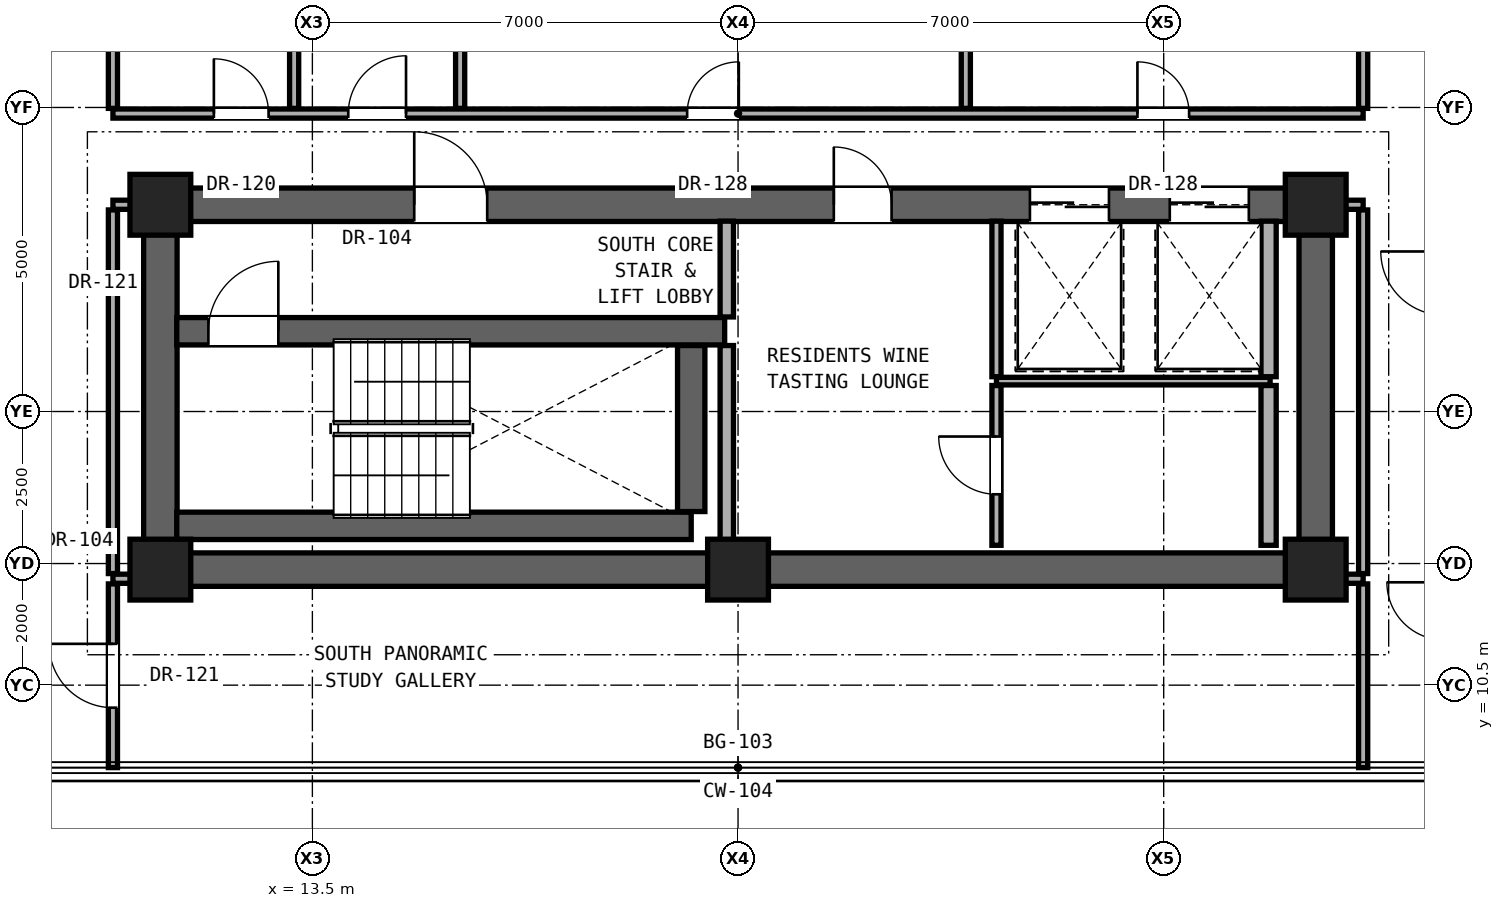
"""IFC4 building model, lengths in metres.
Left out: names, types, materials, properties, quantities, classifications, styles, units other than length and angle.
Written with IfcOpenShell. Run it as: python <this file> out.ifc"""

import sys

from ifc_helpers import new_model, si_unit, direction, frame, frame_2d, origin, origin_2d, place, context, subcontext, project, spatial, rectangle, extrude, element, fill, save


model = new_model("IFC4")
c1 = context("Model", 3, precision=1e-05, world=origin(), true_north=direction((0.0, 1.0)))
c2 = subcontext(c1, "Body", "Model", "MODEL_VIEW")
j1 = project(units=[si_unit("LENGTHUNIT", "METRE"), si_unit("PLANEANGLEUNIT", "RADIAN")], contexts=[c1])
p1 = place(None, origin())
s1 = spatial("IfcSite", under=j1, at=p1, CompositionType="ELEMENT")
p2 = place(p1, origin())
s2 = spatial("IfcBuilding", under=s1, at=p2, CompositionType="ELEMENT")
p3 = place(p2, frame((0.0, 0.0, 177.15)))
s3 = spatial("IfcBuildingStorey", under=s2, at=p3, CompositionType="ELEMENT", Elevation=177.15)
for number, where, z_axis, x_axis in (
    (1, (11.0, 12.4, 0.0), (0.0, 0.0, 1.0), (1.0, 0.0, 0.0)),
    (2, (20.5, 12.4, 0.0), (0.0, 0.0, 1.0), (1.0, 0.0, 0.0)),
    (3, (30.0, 12.4, 0.0), (0.0, 0.0, 1.0), (1.0, 0.0, 0.0)),
    (4, (11.0, 18.4, 0.0), (0.0, 0.0, 1.0), (1.0, 0.0, 0.0)),
    (5, (30.0, 18.4, 0.0), (0.0, 0.0, 1.0), (1.0, 0.0, 0.0)),
):
    element("IfcColumn", number, at=place(p3, frame(where, z_axis=z_axis, x_axis=x_axis)), inside=s3, PredefinedType="COLUMN", context=c2, shape_type="SweptSolid", body=[
        extrude(rectangle(XDim=1.0, YDim=1.0, at=origin_2d()), origin(), (0.0, 0.0, 1.0), 3.25),
    ])
p4 = place(p3, frame((11.0, 12.4, 0.0), z_axis=(0.0, 0.0, 1.0), x_axis=(1.0, 0.0, 0.0)))
e6 = element("IfcWall", 6, at=p4, inside=s3, PredefinedType="SHEAR", context=c2, shape_type="SweptSolid", body=[
    extrude(rectangle(XDim=19.0, YDim=0.55, at=frame_2d((9.5, 0.0))), origin(), (0.0, 0.0, 1.0), 3.05),
])
for number, where, z_axis, x_axis in (
    (7, (11.0, 12.4, 0.0), (0.0, 0.0, 1.0), (0.0, 1.0, 0.0)),
    (8, (30.0, 12.4, 0.0), (0.0, 0.0, 1.0), (0.0, 1.0, 0.0)),
):
    element("IfcWall", number, at=place(p3, frame(where, z_axis=z_axis, x_axis=x_axis)), inside=s3, PredefinedType="SHEAR", context=c2, shape_type="SweptSolid", body=[
        extrude(rectangle(XDim=6.0, YDim=0.55, at=frame_2d((3.0, 0.0))), origin(), (0.0, 0.0, 1.0), 3.05),
    ])
p5 = place(p3, frame((11.0, 18.4, 0.0), z_axis=(0.0, 0.0, 1.0), x_axis=(1.0, 0.0, 0.0)))
e9 = element("IfcWall", 9, at=p5, inside=s3, PredefinedType="SHEAR", context=c2, shape_type="SweptSolid", body=[
    extrude(rectangle(XDim=19.0, YDim=0.55, at=frame_2d((9.5, 0.0))), origin(), (0.0, 0.0, 1.0), 3.05),
])
p6 = place(p5, frame((4.175, 0.0, 0.0)))
e10 = element("IfcOpeningElement", 10, at=p6, cuts=e9, PredefinedType="OPENING", context=c2, shape_type="SweptSolid", body=[
    extrude(rectangle(XDim=1.2, YDim=2.25, at=frame_2d((0.6, 1.125))), frame((0.0, 0.285, 0.0), z_axis=(0.0, -1.0, 0.0), x_axis=(1.0, 0.0, 0.0)), (0.0, 0.0, 1.0), 0.57),
])
p7 = place(p5, frame((11.075, 0.0, 0.0)))
e11 = element("IfcOpeningElement", 11, at=p7, cuts=e9, PredefinedType="OPENING", context=c2, shape_type="SweptSolid", body=[
    extrude(rectangle(XDim=0.95, YDim=2.15, at=frame_2d((0.475, 1.075))), frame((0.0, 0.285, 0.0), z_axis=(0.0, -1.0, 0.0), x_axis=(1.0, 0.0, 0.0)), (0.0, 0.0, 1.0), 0.57),
])
p8 = place(p5, frame((14.3, 0.0, 0.0)))
e12 = element("IfcOpeningElement", 12, at=p8, cuts=e9, PredefinedType="OPENING", context=c2, shape_type="SweptSolid", body=[
    extrude(rectangle(XDim=1.3, YDim=2.3, at=frame_2d((0.65, 1.15))), frame((0.0, 0.285, 0.0), z_axis=(0.0, -1.0, 0.0), x_axis=(1.0, 0.0, 0.0)), (0.0, 0.0, 1.0), 0.57),
])
p9 = place(p5, frame((16.6, 0.0, 0.0)))
e13 = element("IfcOpeningElement", 13, at=p9, cuts=e9, PredefinedType="OPENING", context=c2, shape_type="SweptSolid", body=[
    extrude(rectangle(XDim=1.3, YDim=2.3, at=frame_2d((0.65, 1.15))), frame((0.0, 0.285, 0.0), z_axis=(0.0, -1.0, 0.0), x_axis=(1.0, 0.0, 0.0)), (0.0, 0.0, 1.0), 0.57),
])
for number, where, z_axis, x_axis in (
    (14, (10.22, 12.25, 0.0), (0.0, 0.0, 1.0), (1.0, 0.0, 0.0)),
    (15, (30.27, 12.25, 0.0), (0.0, 0.0, 1.0), (1.0, 0.0, 0.0)),
):
    element("IfcWall", number, at=place(p3, frame(where, z_axis=z_axis, x_axis=x_axis)), inside=s3, PredefinedType="PARTITIONING", context=c2, shape_type="SweptSolid", body=[
        extrude(rectangle(XDim=0.51, YDim=0.15, at=frame_2d((0.255, 0.0))), origin(), (0.0, 0.0, 1.0), 3.05),
    ])
p10 = place(p3, frame((11.27, 13.12, 0.0), z_axis=(0.0, 0.0, 1.0), x_axis=(1.0, 0.0, 0.0)))
e16 = element("IfcWall", 16, at=p10, inside=s3, PredefinedType="SHEAR", context=c2, shape_type="SweptSolid", body=[
    extrude(rectangle(XDim=8.46, YDim=0.45, at=frame_2d((4.23, 0.0))), origin(), (0.0, 0.0, 1.0), 3.05),
])
p11 = place(p3, frame((24.75, 15.5, 0.0), z_axis=(0.0, 0.0, 1.0), x_axis=(1.0, 0.0, 0.0)))
e17 = element("IfcWall", 17, at=p11, inside=s3, PredefinedType="PARTITIONING", context=c2, shape_type="SweptSolid", body=[
    extrude(rectangle(XDim=4.5, YDim=0.125, at=frame_2d((2.25, 0.0))), origin(), (0.0, 0.0, 1.0), 3.05),
])
p12 = place(p3, frame((11.27, 16.32, 0.0), z_axis=(0.0, 0.0, 1.0), x_axis=(1.0, 0.0, 0.0)))
e18 = element("IfcWall", 18, at=p12, inside=s3, PredefinedType="SHEAR", context=c2, shape_type="SweptSolid", body=[
    extrude(rectangle(XDim=9.01, YDim=0.45, at=frame_2d((4.505, 0.0))), origin(), (0.0, 0.0, 1.0), 3.05),
])
p13 = place(p12, frame((0.52, 0.0, 0.0)))
e19 = element("IfcOpeningElement", 19, at=p13, cuts=e18, PredefinedType="OPENING", context=c2, shape_type="SweptSolid", body=[
    extrude(rectangle(XDim=1.15, YDim=2.2, at=frame_2d((0.575, 1.1))), frame((0.0, 0.235, 0.0), z_axis=(0.0, -1.0, 0.0), x_axis=(1.0, 0.0, 0.0)), (0.0, 0.0, 1.0), 0.47),
])
for number, where, z_axis, x_axis in (
    (20, (10.22, 18.4, 0.0), (0.0, 0.0, 1.0), (1.0, 0.0, 0.0)),
    (21, (30.27, 18.4, 0.0), (0.0, 0.0, 1.0), (1.0, 0.0, 0.0)),
):
    element("IfcWall", number, at=place(p3, frame(where, z_axis=z_axis, x_axis=x_axis)), inside=s3, PredefinedType="PARTITIONING", context=c2, shape_type="SweptSolid", body=[
        extrude(rectangle(XDim=0.51, YDim=0.15, at=frame_2d((0.255, 0.0))), origin(), (0.0, 0.0, 1.0), 2.442),
    ])
p14 = place(p3, frame((10.22, 19.9, 0.0), z_axis=(0.0, 0.0, 1.0), x_axis=(1.0, 0.0, 0.0)))
e22 = element("IfcWall", 22, at=p14, inside=s3, PredefinedType="PARTITIONING", context=c2, shape_type="SweptSolid", body=[
    extrude(rectangle(XDim=20.56, YDim=0.15, at=frame_2d((10.28, 0.0))), origin(), (0.0, 0.0, 1.0), 2.186),
])
p15 = place(p14, frame((1.66, 0.0, 0.0)))
e23 = element("IfcOpeningElement", 23, at=p15, cuts=e22, PredefinedType="OPENING", context=c2, shape_type="SweptSolid", body=[
    extrude(rectangle(XDim=0.9, YDim=2.1, at=frame_2d((0.45, 1.05))), frame((0.0, 0.085, 0.0), z_axis=(0.0, -1.0, 0.0), x_axis=(1.0, 0.0, 0.0)), (0.0, 0.0, 1.0), 0.17),
])
p16 = place(p14, frame((3.87, 0.0, 0.0)))
e24 = element("IfcOpeningElement", 24, at=p16, cuts=e22, PredefinedType="OPENING", context=c2, shape_type="SweptSolid", body=[
    extrude(rectangle(XDim=0.95, YDim=2.15, at=frame_2d((0.475, 1.075))), frame((0.0, 0.085, 0.0), z_axis=(0.0, -1.0, 0.0), x_axis=(1.0, 0.0, 0.0)), (0.0, 0.0, 1.0), 0.17),
])
p17 = place(p14, frame((9.443, 0.0, 0.0)))
e25 = element("IfcOpeningElement", 25, at=p17, cuts=e22, PredefinedType="OPENING", context=c2, shape_type="SweptSolid", body=[
    extrude(rectangle(XDim=0.85, YDim=2.01, at=frame_2d((0.425, 1.005))), frame((0.0, 0.085, 0.0), z_axis=(0.0, -1.0, 0.0), x_axis=(1.0, 0.0, 0.0)), (0.0, 0.0, 1.0), 0.17),
])
p18 = place(p14, frame((16.848, 0.0, 0.0)))
e26 = element("IfcOpeningElement", 26, at=p18, cuts=e22, PredefinedType="OPENING", context=c2, shape_type="SweptSolid", body=[
    extrude(rectangle(XDim=0.85, YDim=2.01, at=frame_2d((0.425, 1.005))), frame((0.0, 0.085, 0.0), z_axis=(0.0, -1.0, 0.0), x_axis=(1.0, 0.0, 0.0)), (0.0, 0.0, 1.0), 0.17),
])
p19 = place(p3, frame((10.22, 9.144, 0.0), z_axis=(0.0, 0.0, 1.0), x_axis=(0.0, 1.0, 0.0)))
e27 = element("IfcWall", 27, at=p19, inside=s3, PredefinedType="PARTITIONING", context=c2, shape_type="SweptSolid", body=[
    extrude(rectangle(XDim=3.021, YDim=0.15, at=frame_2d((1.51, 0.0))), origin(), (0.0, 0.0, 1.0), 3.05),
])
p20 = place(p19, frame((0.986, 0.0, 0.0)))
e28 = element("IfcOpeningElement", 28, at=p20, cuts=e27, PredefinedType="OPENING", context=c2, shape_type="SweptSolid", body=[
    extrude(rectangle(XDim=1.05, YDim=2.2, at=frame_2d((0.525, 1.1))), frame((0.0, 0.085, 0.0), z_axis=(0.0, -1.0, 0.0), x_axis=(1.0, 0.0, 0.0)), (0.0, 0.0, 1.0), 0.17),
])
p21 = place(p3, frame((10.22, 12.335, 0.0), z_axis=(0.0, 0.0, 1.0), x_axis=(0.0, 1.0, 0.0)))
e29 = element("IfcWall", 29, at=p21, inside=s3, PredefinedType="PARTITIONING", context=c2, shape_type="SweptSolid", body=[
    extrude(rectangle(XDim=5.98, YDim=0.15, at=frame_2d((2.99, 0.0))), origin(), (0.0, 0.0, 1.0), 2.442),
])
for number, where, z_axis, x_axis in (
    (30, (10.22, 19.985, 0.0), (0.0, 0.0, 1.0), (0.0, 1.0, 0.0)),
    (31, (13.2, 19.985, 0.0), (0.0, 0.0, 1.0), (0.0, 1.0, 0.0)),
    (32, (15.93, 19.985, 0.0), (0.0, 0.0, 1.0), (0.0, 1.0, 0.0)),
):
    element("IfcWall", number, at=place(p3, frame(where, z_axis=z_axis, x_axis=x_axis)), inside=s3, PredefinedType="PARTITIONING", context=c2, shape_type="SweptSolid", body=[
        extrude(rectangle(XDim=2.78, YDim=0.15, at=frame_2d((1.39, 0.0))), origin(), (0.0, 0.0, 1.0), 3.05),
    ])
p22 = place(p3, frame((19.73, 13.355, 0.0), z_axis=(0.0, 0.0, 1.0), x_axis=(0.0, 1.0, 0.0)))
e33 = element("IfcWall", 33, at=p22, inside=s3, PredefinedType="SHEAR", context=c2, shape_type="SweptSolid", body=[
    extrude(rectangle(XDim=2.73, YDim=0.45, at=frame_2d((1.365, 0.0))), origin(), (0.0, 0.0, 1.0), 3.05),
])
p23 = place(p3, frame((20.315, 12.8, 0.0), z_axis=(0.0, 0.0, 1.0), x_axis=(0.0, 1.0, 0.0)))
e34 = element("IfcWall", 34, at=p23, inside=s3, PredefinedType="SOLIDWALL", context=c2, shape_type="SweptSolid", body=[
    extrude(rectangle(XDim=3.285, YDim=0.22, at=frame_2d((1.643, 0.0))), origin(), (0.0, 0.0, 1.0), 3.05),
])
p24 = place(p3, frame((20.315, 16.555, 0.0), z_axis=(0.0, 0.0, 1.0), x_axis=(0.0, 1.0, 0.0)))
e35 = element("IfcWall", 35, at=p24, inside=s3, PredefinedType="SOLIDWALL", context=c2, shape_type="SweptSolid", body=[
    extrude(rectangle(XDim=1.575, YDim=0.22, at=frame_2d((0.788, 0.0))), origin(), (0.0, 0.0, 1.0), 3.05),
])
p25 = place(p3, frame((24.246, 19.985, 0.0), z_axis=(0.0, 0.0, 1.0), x_axis=(0.0, 1.0, 0.0)))
e36 = element("IfcWall", 36, at=p25, inside=s3, PredefinedType="PARTITIONING", context=c2, shape_type="SweptSolid", body=[
    extrude(rectangle(XDim=5.77, YDim=0.15, at=frame_2d((2.885, 0.0))), origin(), (0.0, 0.0, 1.0), 2.186),
])
p26 = place(p3, frame((24.75, 12.8, 0.0), z_axis=(0.0, 0.0, 1.0), x_axis=(0.0, 1.0, 0.0)))
e37 = element("IfcWall", 37, at=p26, inside=s3, PredefinedType="PARTITIONING", context=c2, shape_type="SweptSolid", body=[
    extrude(rectangle(XDim=2.627, YDim=0.15, at=frame_2d((1.314, 0.0))), origin(), (0.0, 0.0, 1.0), 3.05),
])
p27 = place(p26, frame((0.839, 0.0, 0.0)))
e38 = element("IfcOpeningElement", 38, at=p27, cuts=e37, PredefinedType="OPENING", context=c2, shape_type="SweptSolid", body=[
    extrude(rectangle(XDim=0.95, YDim=2.15, at=frame_2d((0.475, 1.075))), frame((0.0, 0.085, 0.0), z_axis=(0.0, -1.0, 0.0), x_axis=(1.0, 0.0, 0.0)), (0.0, 0.0, 1.0), 0.17),
])
p28 = place(p3, frame((24.75, 15.573, 0.0), z_axis=(0.0, 0.0, 1.0), x_axis=(0.0, 1.0, 0.0)))
e39 = element("IfcWall", 39, at=p28, inside=s3, PredefinedType="PARTITIONING", context=c2, shape_type="SweptSolid", body=[
    extrude(rectangle(XDim=2.557, YDim=0.15, at=frame_2d((1.279, 0.0))), origin(), (0.0, 0.0, 1.0), 3.05),
])
p29 = place(p3, frame((29.225, 12.8, 0.0), z_axis=(0.0, 0.0, 1.0), x_axis=(0.0, 1.0, 0.0)))
e40 = element("IfcWall", 40, at=p29, inside=s3, PredefinedType="SOLIDWALL", context=c2, shape_type="SweptSolid", body=[
    extrude(rectangle(XDim=2.627, YDim=0.25, at=frame_2d((1.314, 0.0))), origin(), (0.0, 0.0, 1.0), 3.05),
])
p30 = place(p3, frame((29.225, 15.573, 0.0), z_axis=(0.0, 0.0, 1.0), x_axis=(0.0, 1.0, 0.0)))
e41 = element("IfcWall", 41, at=p30, inside=s3, PredefinedType="SOLIDWALL", context=c2, shape_type="SweptSolid", body=[
    extrude(rectangle(XDim=2.557, YDim=0.25, at=frame_2d((1.279, 0.0))), origin(), (0.0, 0.0, 1.0), 3.05),
])
p31 = place(p3, frame((30.78, 9.144, 0.0), z_axis=(0.0, 0.0, 1.0), x_axis=(0.0, 1.0, 0.0)))
e42 = element("IfcWall", 42, at=p31, inside=s3, PredefinedType="PARTITIONING", context=c2, shape_type="SweptSolid", body=[
    extrude(rectangle(XDim=3.021, YDim=0.15, at=frame_2d((1.51, 0.0))), origin(), (0.0, 0.0, 1.0), 3.05),
])
p32 = place(p3, frame((30.78, 12.335, 0.0), z_axis=(0.0, 0.0, 1.0), x_axis=(0.0, 1.0, 0.0)))
e43 = element("IfcWall", 43, at=p32, inside=s3, PredefinedType="PARTITIONING", context=c2, shape_type="SweptSolid", body=[
    extrude(rectangle(XDim=5.98, YDim=0.15, at=frame_2d((2.99, 0.0))), origin(), (0.0, 0.0, 1.0), 2.442),
])
p33 = place(p3, frame((30.78, 19.985, 0.0), z_axis=(0.0, 0.0, 1.0), x_axis=(0.0, 1.0, 0.0)))
e44 = element("IfcWall", 44, at=p33, inside=s3, PredefinedType="PARTITIONING", context=c2, shape_type="SweptSolid", body=[
    extrude(rectangle(XDim=5.77, YDim=0.15, at=frame_2d((2.885, 0.0))), origin(), (0.0, 0.0, 1.0), 2.346),
])
p34 = place(p6, origin())
e45 = element("IfcDoor", 45, at=p34, inside=s3, OperationType="SINGLE_SWING_LEFT", PredefinedType="DOOR", context=c2, shape_type="SweptSolid", body=[
    extrude(rectangle(XDim=1.2, YDim=2.25, at=frame_2d((0.6, 1.125))), frame((0.0, 0.025, 0.0), z_axis=(0.0, -1.0, 0.0), x_axis=(1.0, 0.0, 0.0)), (0.0, 0.0, 1.0), 0.05),
])
fill(e10, e45)
p35 = place(p13, origin())
e46 = element("IfcDoor", 46, at=p35, inside=s3, OperationType="SINGLE_SWING_RIGHT", PredefinedType="DOOR", context=c2, shape_type="SweptSolid", body=[
    extrude(rectangle(XDim=1.15, YDim=2.2, at=frame_2d((0.575, 1.1))), frame((0.0, 0.025, 0.0), z_axis=(0.0, -1.0, 0.0), x_axis=(1.0, 0.0, 0.0)), (0.0, 0.0, 1.0), 0.05),
])
fill(e19, e46)
p36 = place(p7, origin())
e47 = element("IfcDoor", 47, at=p36, inside=s3, OperationType="SINGLE_SWING_LEFT", PredefinedType="DOOR", context=c2, shape_type="SweptSolid", body=[
    extrude(rectangle(XDim=0.95, YDim=2.15, at=frame_2d((0.475, 1.075))), frame((0.0, 0.025, 0.0), z_axis=(0.0, -1.0, 0.0), x_axis=(1.0, 0.0, 0.0)), (0.0, 0.0, 1.0), 0.05),
])
fill(e11, e47)
p37 = place(p27, origin())
e48 = element("IfcDoor", 48, at=p37, inside=s3, OperationType="SINGLE_SWING_RIGHT", PredefinedType="DOOR", context=c2, shape_type="SweptSolid", body=[
    extrude(rectangle(XDim=0.95, YDim=2.15, at=frame_2d((0.475, 1.075))), frame((0.0, 0.025, 0.0), z_axis=(0.0, -1.0, 0.0), x_axis=(1.0, 0.0, 0.0)), (0.0, 0.0, 1.0), 0.05),
])
fill(e38, e48)
p38 = place(p15, origin())
e49 = element("IfcDoor", 49, at=p38, inside=s3, OperationType="SINGLE_SWING_LEFT", PredefinedType="DOOR", context=c2, shape_type="SweptSolid", body=[
    extrude(rectangle(XDim=0.9, YDim=2.1, at=frame_2d((0.45, 1.05))), frame((0.0, 0.025, 0.0), z_axis=(0.0, -1.0, 0.0), x_axis=(1.0, 0.0, 0.0)), (0.0, 0.0, 1.0), 0.05),
])
fill(e23, e49)
p39 = place(p16, origin())
e50 = element("IfcDoor", 50, at=p39, inside=s3, OperationType="SINGLE_SWING_RIGHT", PredefinedType="DOOR", context=c2, shape_type="SweptSolid", body=[
    extrude(rectangle(XDim=0.95, YDim=2.15, at=frame_2d((0.475, 1.075))), frame((0.0, 0.025, 0.0), z_axis=(0.0, -1.0, 0.0), x_axis=(1.0, 0.0, 0.0)), (0.0, 0.0, 1.0), 0.05),
])
fill(e24, e50)
p40 = place(p17, origin())
e51 = element("IfcDoor", 51, at=p40, inside=s3, OperationType="SINGLE_SWING_RIGHT", PredefinedType="DOOR", context=c2, shape_type="SweptSolid", body=[
    extrude(rectangle(XDim=0.85, YDim=2.01, at=frame_2d((0.425, 1.005))), frame((0.0, 0.025, 0.0), z_axis=(0.0, -1.0, 0.0), x_axis=(1.0, 0.0, 0.0)), (0.0, 0.0, 1.0), 0.05),
])
fill(e25, e51)
p41 = place(p18, origin())
e52 = element("IfcDoor", 52, at=p41, inside=s3, OperationType="SINGLE_SWING_LEFT", PredefinedType="DOOR", context=c2, shape_type="SweptSolid", body=[
    extrude(rectangle(XDim=0.85, YDim=2.01, at=frame_2d((0.425, 1.005))), frame((0.0, 0.025, 0.0), z_axis=(0.0, -1.0, 0.0), x_axis=(1.0, 0.0, 0.0)), (0.0, 0.0, 1.0), 0.05),
])
fill(e26, e52)
p42 = place(p20, origin())
e53 = element("IfcDoor", 53, at=p42, inside=s3, OperationType="SINGLE_SWING_RIGHT", PredefinedType="DOOR", context=c2, shape_type="SweptSolid", body=[
    extrude(rectangle(XDim=1.05, YDim=2.2, at=frame_2d((0.525, 1.1))), frame((0.0, 0.025, 0.0), z_axis=(0.0, -1.0, 0.0), x_axis=(1.0, 0.0, 0.0)), (0.0, 0.0, 1.0), 0.05),
])
fill(e28, e53)
p43 = place(p8, origin())
e54 = element("IfcDoor", 54, at=p43, inside=s3, OperationType="DOUBLE_DOOR_SLIDING", PredefinedType="DOOR", context=c2, shape_type="SweptSolid", body=[
    extrude(rectangle(XDim=1.3, YDim=2.3, at=frame_2d((0.65, 1.15))), frame((0.0, 0.025, 0.0), z_axis=(0.0, -1.0, 0.0), x_axis=(1.0, 0.0, 0.0)), (0.0, 0.0, 1.0), 0.05),
])
fill(e12, e54)
p44 = place(p9, origin())
e55 = element("IfcDoor", 55, at=p44, inside=s3, OperationType="DOUBLE_DOOR_SLIDING", PredefinedType="DOOR", context=c2, shape_type="SweptSolid", body=[
    extrude(rectangle(XDim=1.3, YDim=2.3, at=frame_2d((0.65, 1.15))), frame((0.0, 0.025, 0.0), z_axis=(0.0, -1.0, 0.0), x_axis=(1.0, 0.0, 0.0)), (0.0, 0.0, 1.0), 0.05),
])
fill(e13, e55)
save(model, sys.argv[1])
